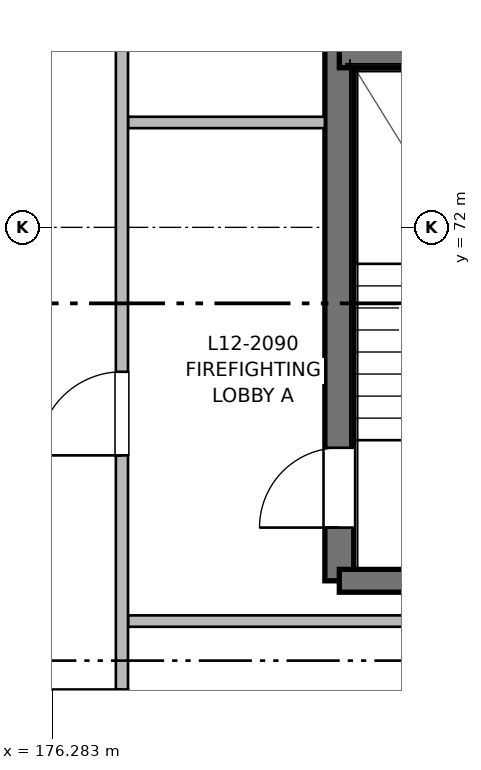
"""IFC4 building model, lengths in metres.
Left out: names, types, materials, properties, quantities, classifications, styles, units other than length and angle.
Written with IfcOpenShell. Run it as: python <this file> out.ifc"""

import sys

from ifc_helpers import new_model, si_unit, direction, frame, frame_2d, origin, place, context, subcontext, project, spatial, rectangle, extrude, element, fill, save


model = new_model("IFC4")
c1 = context("Model", 3, precision=1e-05, world=origin(), true_north=direction((0.0, 1.0)))
c2 = subcontext(c1, "Body", "Model", "MODEL_VIEW")
j1 = project(units=[si_unit("LENGTHUNIT", "METRE"), si_unit("PLANEANGLEUNIT", "RADIAN")], contexts=[c1])
p1 = place(None, origin())
s1 = spatial("IfcSite", under=j1, at=p1, CompositionType="ELEMENT")
p2 = place(p1, origin())
s2 = spatial("IfcBuilding", under=s1, at=p2, CompositionType="ELEMENT")
p3 = place(p2, frame((0.0, 0.0, 39.36)))
s3 = spatial("IfcBuildingStorey", under=s2, at=p3, CompositionType="ELEMENT", Elevation=39.36)
p4 = place(p3, frame((180.06, 67.35, 0.0), z_axis=(0.0, 0.0, 1.0), x_axis=(0.0, 1.0, 0.0)))
e1 = element("IfcWall", 1, at=p4, inside=s3, PredefinedType="SHEAR", context=c2, shape_type="SweptSolid", body=[
    extrude(rectangle(XDim=13.15, YDim=0.38, at=frame_2d((6.575, 0.0))), origin(), (0.0, 0.0, 1.0), 3.2),
])
p5 = place(p4, frame((0.7, 0.0, 0.0)))
e2 = element("IfcOpeningElement", 2, at=p5, cuts=e1, PredefinedType="OPENING", context=c2, shape_type="SweptSolid", body=[
    extrude(rectangle(XDim=1.05, YDim=2.15, at=frame_2d((0.525, 1.075))), frame((0.0, 0.2, 0.0), z_axis=(0.0, -1.0, 0.0), x_axis=(1.0, 0.0, 0.0)), (0.0, 0.0, 1.0), 0.4),
])
p6 = place(p3, frame((183.47, 67.35, 0.0), z_axis=(0.0, 0.0, 1.0), x_axis=(-1.0, 0.0, 0.0)))
e3 = element("IfcWall", 3, at=p6, inside=s3, PredefinedType="SHEAR", context=c2, shape_type="SweptSolid", body=[
    extrude(rectangle(XDim=3.41, YDim=0.3, at=frame_2d((1.705, 0.0))), origin(), (0.0, 0.0, 1.0), 3.2),
])
p7 = place(p3, frame((180.06, 74.24, 0.0), z_axis=(0.0, 0.0, 1.0), x_axis=(1.0, 0.0, 0.0)))
e4 = element("IfcWall", 4, at=p7, inside=s3, PredefinedType="SHEAR", context=c2, shape_type="SweptSolid", body=[
    extrude(rectangle(XDim=3.41, YDim=0.28, at=frame_2d((1.705, 0.0))), origin(), (0.0, 0.0, 1.0), 3.2),
])
p8 = place(p3, frame((177.28, 66.82, 0.0), z_axis=(0.0, 0.0, 1.0), x_axis=(1.0, 0.0, 0.0)))
e5 = element("IfcWall", 5, at=p8, inside=s3, PredefinedType="PARTITIONING", context=c2, shape_type="SweptSolid", body=[
    extrude(rectangle(XDim=6.6, YDim=0.15, at=frame_2d((3.3, 0.0))), origin(), (0.0, 0.0, 1.0), 2.935),
])
p9 = place(p3, frame((177.28, 73.38, 0.0), z_axis=(0.0, 0.0, 1.0), x_axis=(1.0, 0.0, 0.0)))
e6 = element("IfcWall", 6, at=p9, inside=s3, PredefinedType="PARTITIONING", context=c2, shape_type="SweptSolid", body=[
    extrude(rectangle(XDim=2.59, YDim=0.15, at=frame_2d((1.295, 0.0))), origin(), (0.0, 0.0, 1.0), 2.935),
])
p10 = place(p3, frame((177.2, 63.16, 0.0), z_axis=(0.0, 0.0, 1.0), x_axis=(0.0, 1.0, 0.0)))
e7 = element("IfcWall", 7, at=p10, inside=s3, PredefinedType="PARTITIONING", context=c2, shape_type="SweptSolid", body=[
    extrude(rectangle(XDim=43.64, YDim=0.16, at=frame_2d((21.82, 0.0))), origin(), (0.0, 0.0, 1.0), 2.935),
])
p11 = place(p10, frame((5.84, 0.0, 0.0)))
e8 = element("IfcOpeningElement", 8, at=p11, cuts=e7, PredefinedType="OPENING", context=c2, shape_type="SweptSolid", body=[
    extrude(rectangle(XDim=1.1, YDim=2.15, at=frame_2d((0.55, 1.075))), frame((0.0, 0.09, 0.0), z_axis=(0.0, -1.0, 0.0), x_axis=(1.0, 0.0, 0.0)), (0.0, 0.0, 1.0), 0.18),
])
p12 = place(p10, frame((12.24, 0.0, 0.0)))
e9 = element("IfcOpeningElement", 9, at=p12, cuts=e7, PredefinedType="OPENING", context=c2, shape_type="SweptSolid", body=[
    extrude(rectangle(XDim=1.6, YDim=2.15, at=frame_2d((0.8, 1.075))), frame((0.0, 0.09, 0.0), z_axis=(0.0, -1.0, 0.0), x_axis=(1.0, 0.0, 0.0)), (0.0, 0.0, 1.0), 0.18),
])
p13 = place(p10, frame((1.8, 0.0, 0.0)))
e10 = element("IfcOpeningElement", 10, at=p13, cuts=e7, PredefinedType="OPENING", context=c2, shape_type="SweptSolid", body=[
    extrude(rectangle(XDim=0.96, YDim=2.15, at=frame_2d((0.48, 1.075))), frame((0.0, 0.09, 0.0), z_axis=(0.0, -1.0, 0.0), x_axis=(1.0, 0.0, 0.0)), (0.0, 0.0, 1.0), 0.18),
])
p14 = place(p10, frame((25.57, 0.0, 0.0)))
e11 = element("IfcOpeningElement", 11, at=p14, cuts=e7, PredefinedType="OPENING", context=c2, shape_type="SweptSolid", body=[
    extrude(rectangle(XDim=0.98, YDim=2.15, at=frame_2d((0.49, 1.075))), frame((0.0, 0.09, 0.0), z_axis=(0.0, -1.0, 0.0), x_axis=(1.0, 0.0, 0.0)), (0.0, 0.0, 1.0), 0.18),
])
p15 = place(p10, frame((33.83, 0.0, 0.0)))
e12 = element("IfcOpeningElement", 12, at=p15, cuts=e7, PredefinedType="OPENING", context=c2, shape_type="SweptSolid", body=[
    extrude(rectangle(XDim=0.98, YDim=2.15, at=frame_2d((0.49, 1.075))), frame((0.0, 0.09, 0.0), z_axis=(0.0, -1.0, 0.0), x_axis=(1.0, 0.0, 0.0)), (0.0, 0.0, 1.0), 0.18),
])
p16 = place(p5, origin())
e13 = element("IfcDoor", 13, at=p16, inside=s3, OperationType="SINGLE_SWING_LEFT", PredefinedType="DOOR", context=c2, shape_type="SweptSolid", body=[
    extrude(rectangle(XDim=1.05, YDim=2.15, at=frame_2d((0.525, 1.075))), frame((0.0, 0.025, 0.0), z_axis=(0.0, -1.0, 0.0), x_axis=(1.0, 0.0, 0.0)), (0.0, 0.0, 1.0), 0.05),
])
fill(e2, e13)
p17 = place(p11, origin())
e14 = element("IfcDoor", 14, at=p17, inside=s3, OperationType="SINGLE_SWING_LEFT", PredefinedType="DOOR", context=c2, shape_type="SweptSolid", body=[
    extrude(rectangle(XDim=1.1, YDim=2.15, at=frame_2d((0.55, 1.075))), frame((0.0, 0.025, 0.0), z_axis=(0.0, -1.0, 0.0), x_axis=(1.0, 0.0, 0.0)), (0.0, 0.0, 1.0), 0.05),
])
fill(e8, e14)
p18 = place(p13, origin())
e15 = element("IfcDoor", 15, at=p18, inside=s3, OperationType="SINGLE_SWING_RIGHT", PredefinedType="DOOR", context=c2, shape_type="SweptSolid", body=[
    extrude(rectangle(XDim=0.96, YDim=2.15, at=frame_2d((0.48, 1.075))), frame((0.0, 0.025, 0.0), z_axis=(0.0, -1.0, 0.0), x_axis=(1.0, 0.0, 0.0)), (0.0, 0.0, 1.0), 0.05),
])
fill(e10, e15)
save(model, sys.argv[1])
